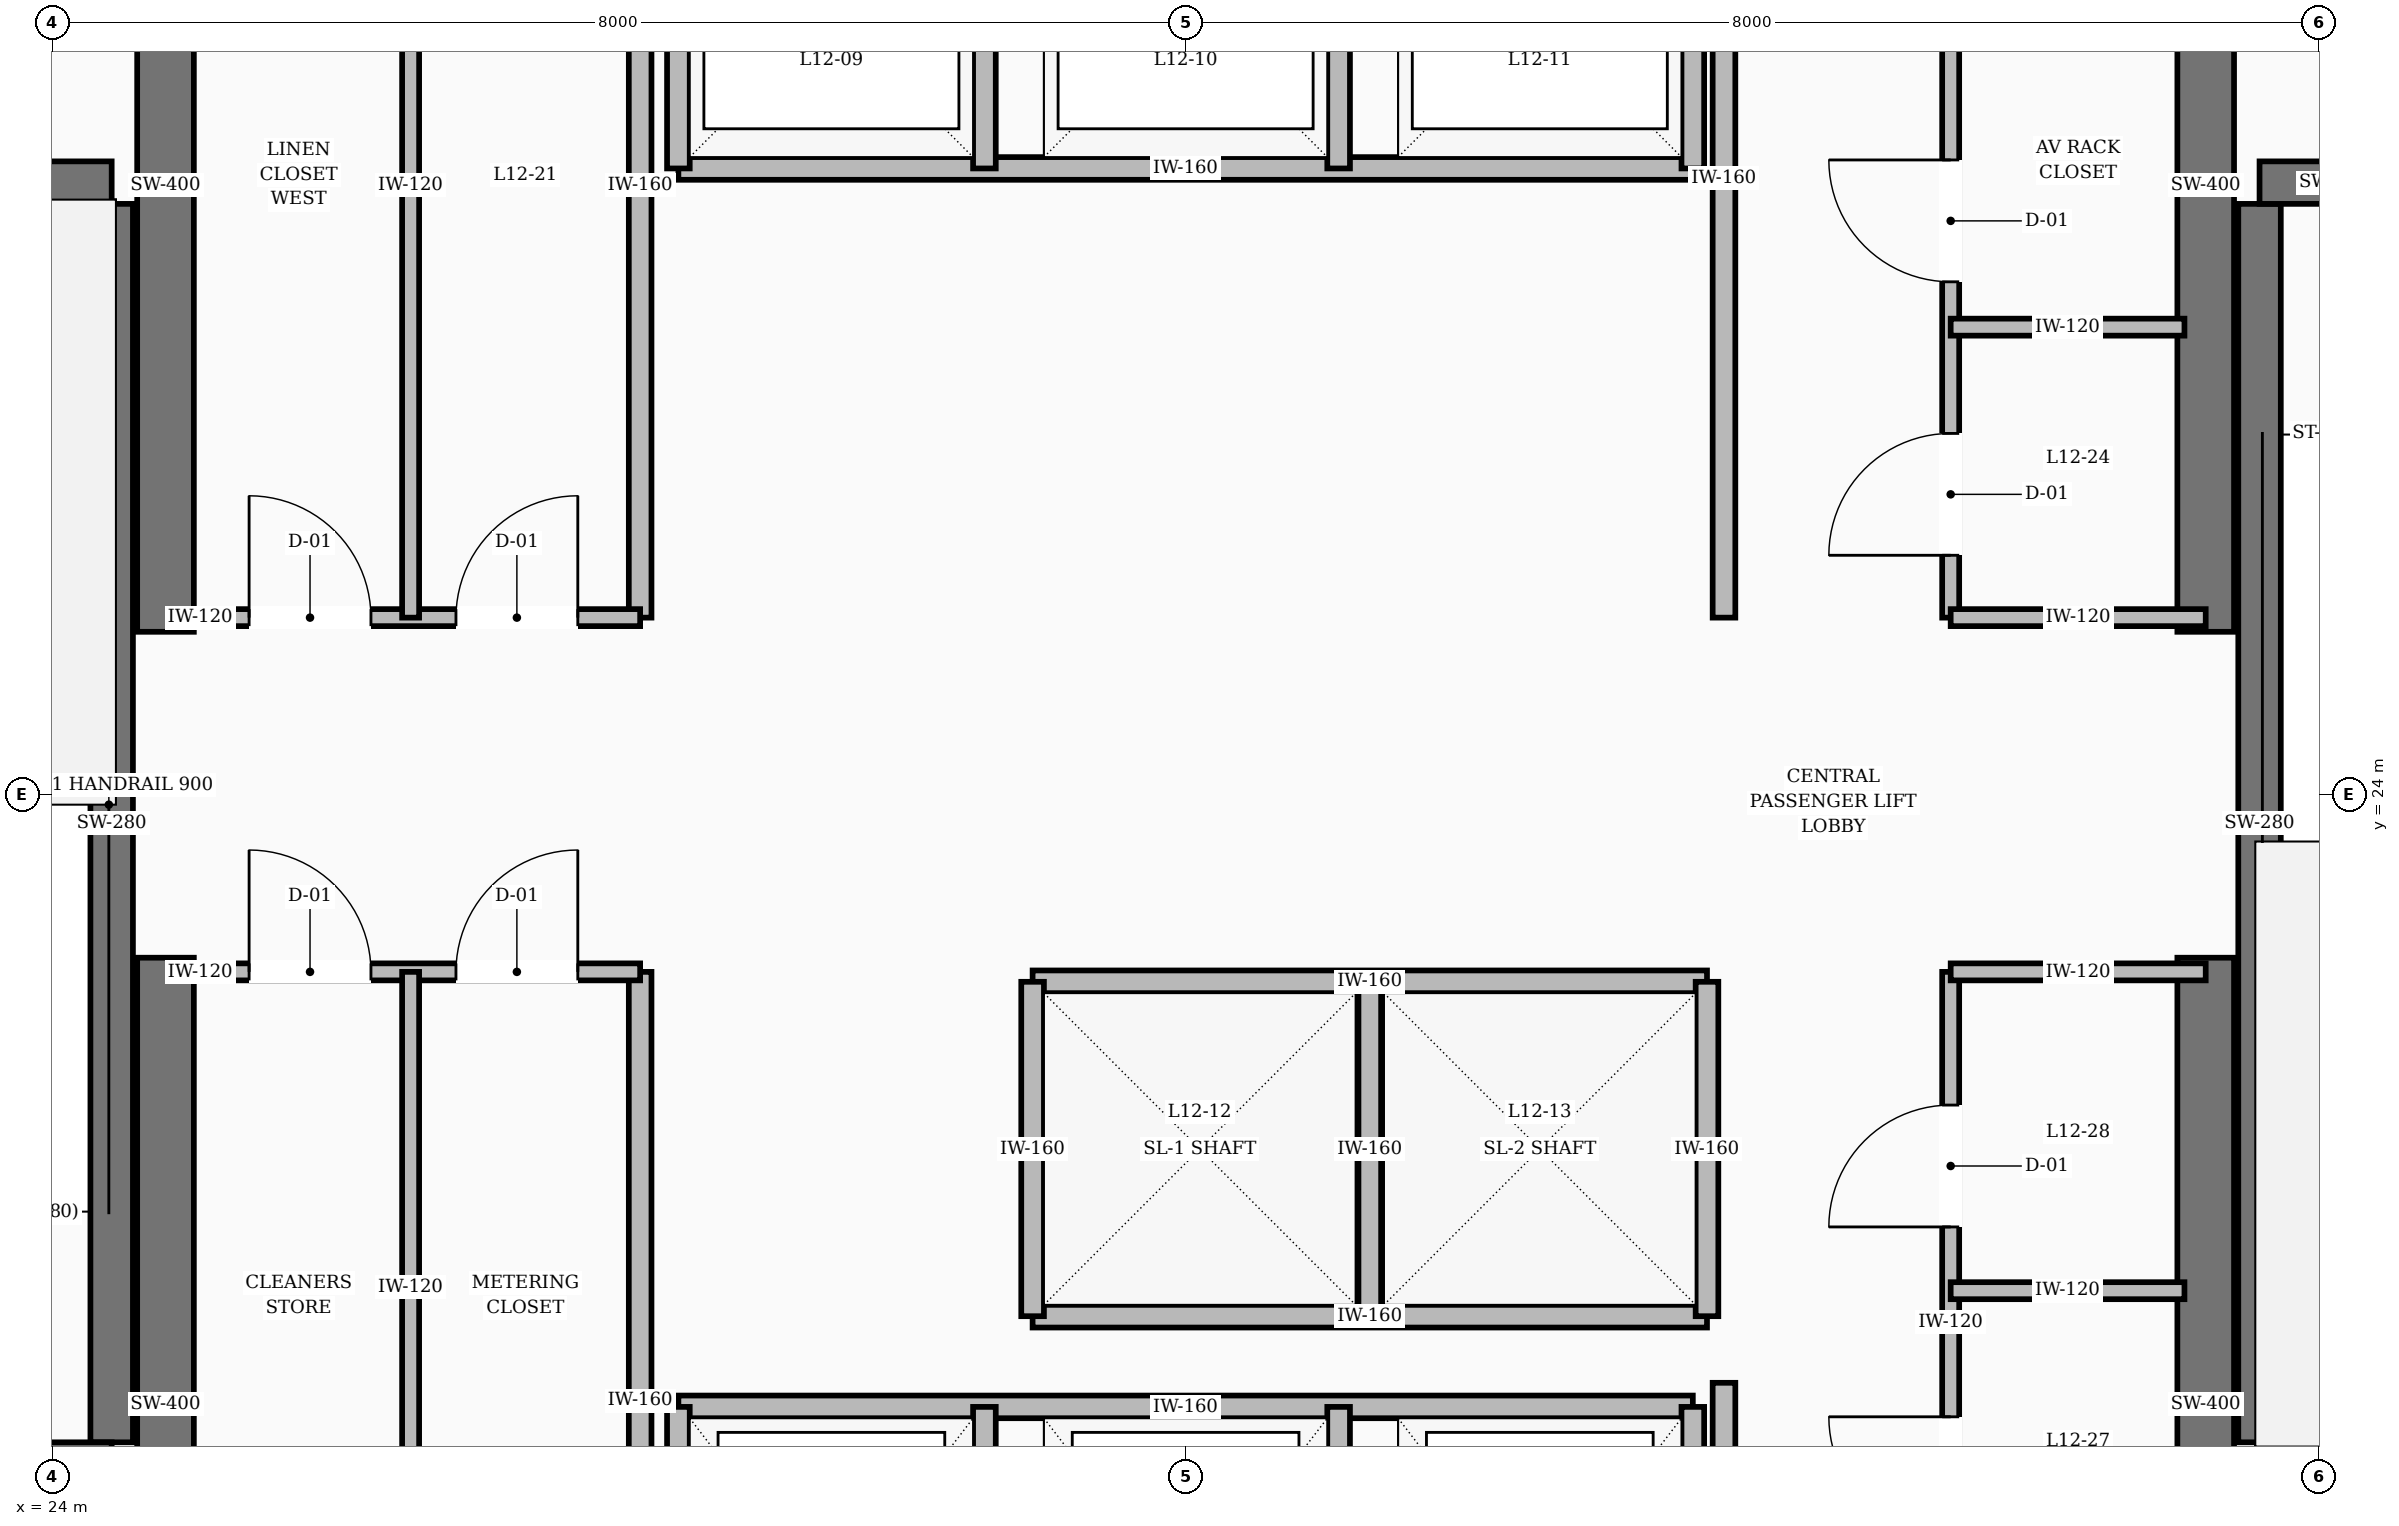
"""IFC4 building model, lengths in metres.
Left out: names, types, materials, properties, quantities, classifications, styles, units other than length and angle.
Written with IfcOpenShell. Run it as: python <this file> out.ifc"""

import sys

from ifc_helpers import new_model, si_unit, direction, frame, frame_2d, origin, place, context, subcontext, project, spatial, rectangle, extrude, element, fill, save


model = new_model("IFC4")
c1 = context("Model", 3, precision=1e-05, world=origin(), true_north=direction((0.0, 1.0)))
c2 = subcontext(c1, "Body", "Model", "MODEL_VIEW")
j1 = project(units=[si_unit("LENGTHUNIT", "METRE"), si_unit("PLANEANGLEUNIT", "RADIAN")], contexts=[c1])
p1 = place(None, origin())
s1 = spatial("IfcSite", under=j1, at=p1, CompositionType="ELEMENT")
p2 = place(p1, origin())
s2 = spatial("IfcBuilding", under=s1, at=p2, CompositionType="ELEMENT")
p3 = place(p2, frame((0.0, 0.0, 30.4)))
s3 = spatial("IfcBuildingStorey", under=s2, at=p3, CompositionType="ELEMENT", Elevation=30.4)
for number, where, z_axis, x_axis in (
    (1, (24.8, 16.55, 0.0), (0.0, 0.0, 1.0), (0.0, 1.0, 0.0)),
    (2, (24.8, 25.15, 0.0), (0.0, 0.0, 1.0), (0.0, 1.0, 0.0)),
    (3, (39.2, 16.55, 0.0), (0.0, 0.0, 1.0), (0.0, 1.0, 0.0)),
    (4, (39.2, 25.15, 0.0), (0.0, 0.0, 1.0), (0.0, 1.0, 0.0)),
):
    element("IfcWall", number, at=place(p3, frame(where, z_axis=z_axis, x_axis=x_axis)), inside=s3, PredefinedType="SHEAR", context=c2, shape_type="SweptSolid", body=[
        extrude(rectangle(XDim=6.3, YDim=0.4, at=frame_2d((3.15, 0.0))), origin(), (0.0, 0.0, 1.0), 3.6),
    ])
p4 = place(p3, frame((24.42, 19.43, 0.0), z_axis=(0.0, 0.0, 1.0), x_axis=(0.0, 1.0, 0.0)))
e5 = element("IfcWall", 5, at=p4, inside=s3, PredefinedType="SHEAR", context=c2, shape_type="SweptSolid", body=[
    extrude(rectangle(XDim=8.74, YDim=0.3, at=frame_2d((4.37, 0.0))), origin(), (0.0, 0.0, 1.0), 3.6),
])
p5 = place(p3, frame((20.82, 19.28, 0.0), z_axis=(0.0, 0.0, 1.0), x_axis=(1.0, 0.0, 0.0)))
e6 = element("IfcWall", 6, at=p5, inside=s3, PredefinedType="SHEAR", context=c2, shape_type="SweptSolid", body=[
    extrude(rectangle(XDim=3.6, YDim=0.3, at=frame_2d((1.8, 0.0))), origin(), (0.0, 0.0, 1.0), 3.6),
])
p6 = place(p5, frame((1.3, 0.0, 0.0)))
e7 = element("IfcOpeningElement", 7, at=p6, cuts=e6, PredefinedType="OPENING", context=c2, shape_type="SweptSolid", body=[
    extrude(rectangle(XDim=1.1, YDim=2.1, at=frame_2d((0.55, 1.05))), frame((0.0, 0.16, 0.0), z_axis=(0.0, -1.0, 0.0), x_axis=(1.0, 0.0, 0.0)), (0.0, 0.0, 1.0), 0.32),
])
p7 = place(p3, frame((20.82, 28.32, 0.0), z_axis=(0.0, 0.0, 1.0), x_axis=(1.0, 0.0, 0.0)))
e8 = element("IfcWall", 8, at=p7, inside=s3, PredefinedType="SHEAR", context=c2, shape_type="SweptSolid", body=[
    extrude(rectangle(XDim=3.6, YDim=0.3, at=frame_2d((1.8, 0.0))), origin(), (0.0, 0.0, 1.0), 3.6),
])
p8 = place(p3, frame((39.58, 19.43, 0.0), z_axis=(0.0, 0.0, 1.0), x_axis=(0.0, 1.0, 0.0)))
e9 = element("IfcWall", 9, at=p8, inside=s3, PredefinedType="SHEAR", context=c2, shape_type="SweptSolid", body=[
    extrude(rectangle(XDim=8.74, YDim=0.3, at=frame_2d((4.37, 0.0))), origin(), (0.0, 0.0, 1.0), 3.6),
])
p9 = place(p3, frame((39.58, 19.28, 0.0), z_axis=(0.0, 0.0, 1.0), x_axis=(1.0, 0.0, 0.0)))
e10 = element("IfcWall", 10, at=p9, inside=s3, PredefinedType="SHEAR", context=c2, shape_type="SweptSolid", body=[
    extrude(rectangle(XDim=3.6, YDim=0.3, at=frame_2d((1.8, 0.0))), origin(), (0.0, 0.0, 1.0), 3.6),
])
p10 = place(p3, frame((39.58, 28.32, 0.0), z_axis=(0.0, 0.0, 1.0), x_axis=(1.0, 0.0, 0.0)))
e11 = element("IfcWall", 11, at=p10, inside=s3, PredefinedType="SHEAR", context=c2, shape_type="SweptSolid", body=[
    extrude(rectangle(XDim=3.6, YDim=0.3, at=frame_2d((1.8, 0.0))), origin(), (0.0, 0.0, 1.0), 3.6),
])
p11 = place(p10, frame((1.3, 0.0, 0.0)))
e12 = element("IfcOpeningElement", 12, at=p11, cuts=e11, PredefinedType="OPENING", context=c2, shape_type="SweptSolid", body=[
    extrude(rectangle(XDim=1.1, YDim=2.1, at=frame_2d((0.55, 1.05))), frame((0.0, 0.16, 0.0), z_axis=(0.0, -1.0, 0.0), x_axis=(1.0, 0.0, 0.0)), (0.0, 0.0, 1.0), 0.32),
])
p12 = place(p3, frame((35.8, 16.55, 0.0), z_axis=(0.0, 0.0, 1.0), x_axis=(0.0, 1.0, 0.0)))
e13 = element("IfcWall", 13, at=p12, inside=s3, PredefinedType="SOLIDWALL", context=c2, shape_type="SweptSolid", body=[
    extrude(rectangle(XDim=3.3, YDim=0.16, at=frame_2d((1.65, 0.0))), origin(), (0.0, 0.0, 1.0), 2.61),
])
p13 = place(p3, frame((35.8, 25.25, 0.0), z_axis=(0.0, 0.0, 1.0), x_axis=(0.0, 1.0, 0.0)))
e14 = element("IfcWall", 14, at=p13, inside=s3, PredefinedType="SOLIDWALL", context=c2, shape_type="SweptSolid", body=[
    extrude(rectangle(XDim=6.2, YDim=0.16, at=frame_2d((3.1, 0.0))), origin(), (0.0, 0.0, 1.0), 2.61),
])
p14 = place(p3, frame((28.42, 28.42, 0.0), z_axis=(0.0, 0.0, 1.0), x_axis=(1.0, 0.0, 0.0)))
e15 = element("IfcWall", 15, at=p14, inside=s3, PredefinedType="SOLIDWALL", context=c2, shape_type="SweptSolid", body=[
    extrude(rectangle(XDim=7.16, YDim=0.16, at=frame_2d((3.58, 0.0))), origin(), (0.0, 0.0, 1.0), 2.61),
])
for number, where, z_axis, x_axis in (
    (16, (28.42, 28.42, 0.0), (0.0, 0.0, 1.0), (0.0, 1.0, 0.0)),
    (17, (30.58, 28.42, 0.0), (0.0, 0.0, 1.0), (0.0, 1.0, 0.0)),
    (18, (33.08, 28.42, 0.0), (0.0, 0.0, 1.0), (0.0, 1.0, 0.0)),
    (19, (35.58, 28.42, 0.0), (0.0, 0.0, 1.0), (0.0, 1.0, 0.0)),
):
    element("IfcWall", number, at=place(p3, frame(where, z_axis=z_axis, x_axis=x_axis)), inside=s3, PredefinedType="SOLIDWALL", context=c2, shape_type="SweptSolid", body=[
        extrude(rectangle(XDim=2.16, YDim=0.16, at=frame_2d((1.08, 0.0))), origin(), (0.0, 0.0, 1.0), 2.61),
    ])
for number, where, z_axis, x_axis in (
    (20, (30.92, 22.68, 0.0), (0.0, 0.0, 1.0), (1.0, 0.0, 0.0)),
    (21, (30.92, 20.32, 0.0), (0.0, 0.0, 1.0), (1.0, 0.0, 0.0)),
):
    element("IfcWall", number, at=place(p3, frame(where, z_axis=z_axis, x_axis=x_axis)), inside=s3, PredefinedType="SOLIDWALL", context=c2, shape_type="SweptSolid", body=[
        extrude(rectangle(XDim=4.76, YDim=0.16, at=frame_2d((2.38, 0.0))), origin(), (0.0, 0.0, 1.0), 2.61),
    ])
for number, where, z_axis, x_axis in (
    (22, (30.92, 20.32, 0.0), (0.0, 0.0, 1.0), (0.0, 1.0, 0.0)),
    (23, (33.3, 20.32, 0.0), (0.0, 0.0, 1.0), (0.0, 1.0, 0.0)),
    (24, (35.68, 20.32, 0.0), (0.0, 0.0, 1.0), (0.0, 1.0, 0.0)),
):
    element("IfcWall", number, at=place(p3, frame(where, z_axis=z_axis, x_axis=x_axis)), inside=s3, PredefinedType="SOLIDWALL", context=c2, shape_type="SweptSolid", body=[
        extrude(rectangle(XDim=2.36, YDim=0.16, at=frame_2d((1.18, 0.0))), origin(), (0.0, 0.0, 1.0), 2.61),
    ])
p15 = place(p3, frame((28.42, 19.68, 0.0), z_axis=(0.0, 0.0, 1.0), x_axis=(1.0, 0.0, 0.0)))
e25 = element("IfcWall", 25, at=p15, inside=s3, PredefinedType="SOLIDWALL", context=c2, shape_type="SweptSolid", body=[
    extrude(rectangle(XDim=7.16, YDim=0.16, at=frame_2d((3.58, 0.0))), origin(), (0.0, 0.0, 1.0), 2.61),
])
for number, where, z_axis, x_axis in (
    (26, (28.42, 16.92, 0.0), (0.0, 0.0, 1.0), (0.0, 1.0, 0.0)),
    (27, (30.58, 16.92, 0.0), (0.0, 0.0, 1.0), (0.0, 1.0, 0.0)),
    (28, (33.08, 16.92, 0.0), (0.0, 0.0, 1.0), (0.0, 1.0, 0.0)),
    (29, (35.58, 16.92, 0.0), (0.0, 0.0, 1.0), (0.0, 1.0, 0.0)),
):
    element("IfcWall", number, at=place(p3, frame(where, z_axis=z_axis, x_axis=x_axis)), inside=s3, PredefinedType="SOLIDWALL", context=c2, shape_type="SweptSolid", body=[
        extrude(rectangle(XDim=2.76, YDim=0.16, at=frame_2d((1.38, 0.0))), origin(), (0.0, 0.0, 1.0), 2.61),
    ])
p16 = place(p3, frame((28.15, 16.7, 0.0), z_axis=(0.0, 0.0, 1.0), x_axis=(0.0, 1.0, 0.0)))
e30 = element("IfcWall", 30, at=p16, inside=s3, PredefinedType="SOLIDWALL", context=c2, shape_type="SweptSolid", body=[
    extrude(rectangle(XDim=6.05, YDim=0.16, at=frame_2d((3.025, 0.0))), origin(), (0.0, 0.0, 1.0), 2.61),
])
p17 = place(p3, frame((28.15, 25.25, 0.0), z_axis=(0.0, 0.0, 1.0), x_axis=(0.0, 1.0, 0.0)))
e31 = element("IfcWall", 31, at=p17, inside=s3, PredefinedType="SOLIDWALL", context=c2, shape_type="SweptSolid", body=[
    extrude(rectangle(XDim=6.1, YDim=0.16, at=frame_2d((3.05, 0.0))), origin(), (0.0, 0.0, 1.0), 2.61),
])
p18 = place(p3, frame((24.95, 25.25, 0.0), z_axis=(0.0, 0.0, 1.0), x_axis=(1.0, 0.0, 0.0)))
e32 = element("IfcWall", 32, at=p18, inside=s3, PredefinedType="PARTITIONING", context=c2, shape_type="SweptSolid", body=[
    extrude(rectangle(XDim=3.2, YDim=0.12, at=frame_2d((1.6, 0.0))), origin(), (0.0, 0.0, 1.0), 2.61),
])
p19 = place(p18, frame((1.125, 0.0, 0.0)))
e33 = element("IfcOpeningElement", 33, at=p19, cuts=e32, PredefinedType="OPENING", context=c2, shape_type="SweptSolid", body=[
    extrude(rectangle(XDim=0.95, YDim=2.1, at=frame_2d((0.475, 1.05))), frame((0.0, 0.07, 0.0), z_axis=(0.0, -1.0, 0.0), x_axis=(1.0, 0.0, 0.0)), (0.0, 0.0, 1.0), 0.14),
])
p20 = place(p3, frame((24.95, 22.75, 0.0), z_axis=(0.0, 0.0, 1.0), x_axis=(1.0, 0.0, 0.0)))
e34 = element("IfcWall", 34, at=p20, inside=s3, PredefinedType="PARTITIONING", context=c2, shape_type="SweptSolid", body=[
    extrude(rectangle(XDim=3.2, YDim=0.12, at=frame_2d((1.6, 0.0))), origin(), (0.0, 0.0, 1.0), 2.61),
])
p21 = place(p20, frame((1.125, 0.0, 0.0)))
e35 = element("IfcOpeningElement", 35, at=p21, cuts=e34, PredefinedType="OPENING", context=c2, shape_type="SweptSolid", body=[
    extrude(rectangle(XDim=0.95, YDim=2.1, at=frame_2d((0.475, 1.05))), frame((0.0, 0.07, 0.0), z_axis=(0.0, -1.0, 0.0), x_axis=(1.0, 0.0, 0.0)), (0.0, 0.0, 1.0), 0.14),
])
p22 = place(p3, frame((37.4, 25.25, 0.0), z_axis=(0.0, 0.0, 1.0), x_axis=(0.0, 1.0, 0.0)))
e36 = element("IfcWall", 36, at=p22, inside=s3, PredefinedType="PARTITIONING", context=c2, shape_type="SweptSolid", body=[
    extrude(rectangle(XDim=6.2, YDim=0.12, at=frame_2d((3.1, 0.0))), origin(), (0.0, 0.0, 1.0), 2.61),
])
p23 = place(p22, frame((0.8, 0.0, 0.0)))
e37 = element("IfcOpeningElement", 37, at=p23, cuts=e36, PredefinedType="OPENING", context=c2, shape_type="SweptSolid", body=[
    extrude(rectangle(XDim=0.86, YDim=2.1, at=frame_2d((0.43, 1.05))), frame((0.0, 0.07, 0.0), z_axis=(0.0, -1.0, 0.0), x_axis=(1.0, 0.0, 0.0)), (0.0, 0.0, 1.0), 0.14),
])
p24 = place(p22, frame((3.8, 0.0, 0.0)))
e38 = element("IfcOpeningElement", 38, at=p24, cuts=e36, PredefinedType="OPENING", context=c2, shape_type="SweptSolid", body=[
    extrude(rectangle(XDim=0.86, YDim=2.1, at=frame_2d((0.43, 1.05))), frame((0.0, 0.07, 0.0), z_axis=(0.0, -1.0, 0.0), x_axis=(1.0, 0.0, 0.0)), (0.0, 0.0, 1.0), 0.14),
])
p25 = place(p3, frame((37.4, 25.25, 0.0), z_axis=(0.0, 0.0, 1.0), x_axis=(1.0, 0.0, 0.0)))
e39 = element("IfcWall", 39, at=p25, inside=s3, PredefinedType="PARTITIONING", context=c2, shape_type="SweptSolid", body=[
    extrude(rectangle(XDim=1.8, YDim=0.12, at=frame_2d((0.9, 0.0))), origin(), (0.0, 0.0, 1.0), 2.61),
])
p26 = place(p3, frame((37.4, 18.3, 0.0), z_axis=(0.0, 0.0, 1.0), x_axis=(0.0, 1.0, 0.0)))
e40 = element("IfcWall", 40, at=p26, inside=s3, PredefinedType="PARTITIONING", context=c2, shape_type="SweptSolid", body=[
    extrude(rectangle(XDim=4.45, YDim=0.12, at=frame_2d((2.225, 0.0))), origin(), (0.0, 0.0, 1.0), 2.61),
])
p27 = place(p26, frame((1.75, 0.0, 0.0)))
e41 = element("IfcOpeningElement", 41, at=p27, cuts=e40, PredefinedType="OPENING", context=c2, shape_type="SweptSolid", body=[
    extrude(rectangle(XDim=0.95, YDim=2.1, at=frame_2d((0.475, 1.05))), frame((0.0, 0.07, 0.0), z_axis=(0.0, -1.0, 0.0), x_axis=(1.0, 0.0, 0.0)), (0.0, 0.0, 1.0), 0.14),
])
p28 = place(p3, frame((37.4, 22.75, 0.0), z_axis=(0.0, 0.0, 1.0), x_axis=(1.0, 0.0, 0.0)))
e42 = element("IfcWall", 42, at=p28, inside=s3, PredefinedType="PARTITIONING", context=c2, shape_type="SweptSolid", body=[
    extrude(rectangle(XDim=1.8, YDim=0.12, at=frame_2d((0.9, 0.0))), origin(), (0.0, 0.0, 1.0), 2.61),
])
p29 = place(p3, frame((24.95, 27.55, 0.0), z_axis=(0.0, 0.0, 1.0), x_axis=(1.0, 0.0, 0.0)))
e43 = element("IfcWall", 43, at=p29, inside=s3, PredefinedType="PARTITIONING", context=c2, shape_type="SweptSolid", body=[
    extrude(rectangle(XDim=3.2, YDim=0.12, at=frame_2d((1.6, 0.0))), origin(), (0.0, 0.0, 1.0), 2.61),
])
p30 = place(p29, frame((1.125, 0.0, 0.0)))
e44 = element("IfcOpeningElement", 44, at=p30, cuts=e43, PredefinedType="OPENING", context=c2, shape_type="SweptSolid", body=[
    extrude(rectangle(XDim=0.95, YDim=2.1, at=frame_2d((0.475, 1.05))), frame((0.0, 0.07, 0.0), z_axis=(0.0, -1.0, 0.0), x_axis=(1.0, 0.0, 0.0)), (0.0, 0.0, 1.0), 0.14),
])
p31 = place(p3, frame((37.4, 28.3, 0.0), z_axis=(0.0, 0.0, 1.0), x_axis=(1.0, 0.0, 0.0)))
e45 = element("IfcWall", 45, at=p31, inside=s3, PredefinedType="PARTITIONING", context=c2, shape_type="SweptSolid", body=[
    extrude(rectangle(XDim=1.65, YDim=0.12, at=frame_2d((0.825, 0.0))), origin(), (0.0, 0.0, 1.0), 2.61),
])
p32 = place(p19, origin())
e46 = element("IfcDoor", 46, at=p32, inside=s3, OperationType="SINGLE_SWING_LEFT", PredefinedType="DOOR", context=c2, shape_type="SweptSolid", body=[
    extrude(rectangle(XDim=0.95, YDim=2.1, at=frame_2d((0.475, 1.05))), frame((0.0, 0.025, 0.0), z_axis=(0.0, -1.0, 0.0), x_axis=(1.0, 0.0, 0.0)), (0.0, 0.0, 1.0), 0.05),
])
fill(e33, e46)
p33 = place(p30, origin())
e47 = element("IfcDoor", 47, at=p33, inside=s3, OperationType="SINGLE_SWING_RIGHT", PredefinedType="DOOR", context=c2, shape_type="SweptSolid", body=[
    extrude(rectangle(XDim=0.95, YDim=2.1, at=frame_2d((0.475, 1.05))), frame((0.0, 0.025, 0.0), z_axis=(0.0, -1.0, 0.0), x_axis=(1.0, 0.0, 0.0)), (0.0, 0.0, 1.0), 0.05),
])
fill(e44, e47)
p34 = place(p21, origin())
e48 = element("IfcDoor", 48, at=p34, inside=s3, OperationType="SINGLE_SWING_LEFT", PredefinedType="DOOR", context=c2, shape_type="SweptSolid", body=[
    extrude(rectangle(XDim=0.95, YDim=2.1, at=frame_2d((0.475, 1.05))), frame((0.0, 0.025, 0.0), z_axis=(0.0, -1.0, 0.0), x_axis=(1.0, 0.0, 0.0)), (0.0, 0.0, 1.0), 0.05),
])
fill(e35, e48)
p35 = place(p23, origin())
e49 = element("IfcDoor", 49, at=p35, inside=s3, OperationType="SINGLE_SWING_RIGHT", PredefinedType="DOOR", context=c2, shape_type="SweptSolid", body=[
    extrude(rectangle(XDim=0.86, YDim=2.1, at=frame_2d((0.43, 1.05))), frame((0.0, 0.025, 0.0), z_axis=(0.0, -1.0, 0.0), x_axis=(1.0, 0.0, 0.0)), (0.0, 0.0, 1.0), 0.05),
])
fill(e37, e49)
p36 = place(p24, origin())
e50 = element("IfcDoor", 50, at=p36, inside=s3, OperationType="SINGLE_SWING_LEFT", PredefinedType="DOOR", context=c2, shape_type="SweptSolid", body=[
    extrude(rectangle(XDim=0.86, YDim=2.1, at=frame_2d((0.43, 1.05))), frame((0.0, 0.025, 0.0), z_axis=(0.0, -1.0, 0.0), x_axis=(1.0, 0.0, 0.0)), (0.0, 0.0, 1.0), 0.05),
])
fill(e38, e50)
p37 = place(p27, origin())
e51 = element("IfcDoor", 51, at=p37, inside=s3, OperationType="SINGLE_SWING_RIGHT", PredefinedType="DOOR", context=c2, shape_type="SweptSolid", body=[
    extrude(rectangle(XDim=0.95, YDim=2.1, at=frame_2d((0.475, 1.05))), frame((0.0, 0.025, 0.0), z_axis=(0.0, -1.0, 0.0), x_axis=(1.0, 0.0, 0.0)), (0.0, 0.0, 1.0), 0.05),
])
fill(e41, e51)
save(model, sys.argv[1])
